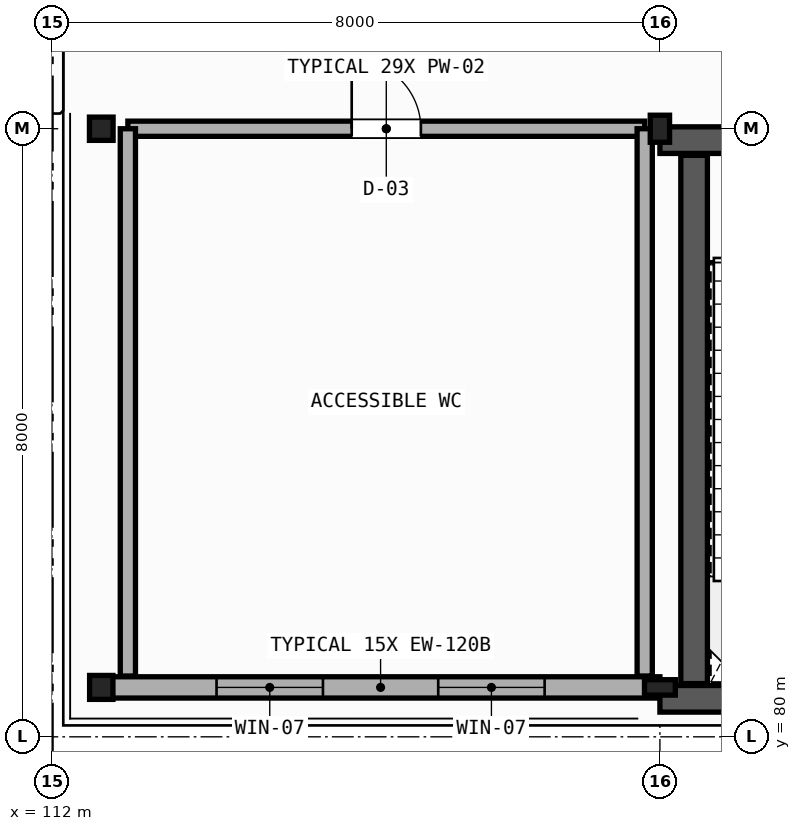
"""IFC4 building model, lengths in metres.
Left out: names, types, materials, properties, quantities, classifications, styles, units other than length and angle.
Written with IfcOpenShell. Run it as: python <this file> out.ifc"""

import sys

from ifc_helpers import new_model, si_unit, direction, frame, frame_2d, origin, origin_2d, place, context, subcontext, project, spatial, rectangle, hollow_rectangle, i_section, extrude, element, fill, save


model = new_model("IFC4")
c1 = context("Model", 3, precision=1e-05, world=origin(), true_north=direction((0.0, 1.0)))
c2 = subcontext(c1, "Body", "Model", "MODEL_VIEW")
j1 = project(units=[si_unit("LENGTHUNIT", "METRE"), si_unit("PLANEANGLEUNIT", "RADIAN")], contexts=[c1])
p1 = place(None, origin())
s1 = spatial("IfcSite", under=j1, at=p1, CompositionType="ELEMENT")
p2 = place(p1, origin())
s2 = spatial("IfcBuilding", under=s1, at=p2, CompositionType="ELEMENT")
p3 = place(p2, frame((0.0, 0.0, 10.2)))
s3 = spatial("IfcBuildingStorey", under=s2, at=p3, CompositionType="ELEMENT", Elevation=10.2)
p4 = place(p3, frame((112.65, 80.65, 0.0), z_axis=(0.0, 0.0, 1.0), x_axis=(1.0, 0.0, 0.0)))
e1 = element("IfcColumn", 1, at=p4, inside=s3, PredefinedType="COLUMN", context=c2, shape_type="SweptSolid", body=[
    extrude(i_section(OverallWidth=0.307, OverallDepth=0.315, WebThickness=0.012, FlangeThickness=0.019, FilletRadius=0.013, at=origin_2d()), origin(), (0.0, 0.0, 1.0), 4.56),
])
p5 = place(p3, frame((112.65, 88.0, 0.0), z_axis=(0.0, 0.0, 1.0), x_axis=(0.0, 1.0, 0.0)))
e2 = element("IfcColumn", 2, at=p5, inside=s3, PredefinedType="COLUMN", context=c2, shape_type="SweptSolid", body=[
    extrude(i_section(OverallWidth=0.306, OverallDepth=0.311, WebThickness=0.011, FlangeThickness=0.017, FilletRadius=0.013, at=origin_2d()), origin(), (0.0, 0.0, 1.0), 4.56),
])
p6 = place(p3, frame((120.0, 80.65, 0.0), z_axis=(0.0, 0.0, 1.0), x_axis=(0.0, 1.0, 0.0)))
e3 = element("IfcColumn", 3, at=p6, inside=s3, PredefinedType="COLUMN", context=c2, shape_type="SweptSolid", body=[
    extrude(hollow_rectangle(XDim=0.203, YDim=0.406, WallThickness=0.012, InnerFilletRadius=0.012, OuterFilletRadius=0.024, at=origin_2d()), origin(), (0.0, 0.0, 1.0), 4.56),
])
p7 = place(p3, frame((120.0, 88.0, 0.0), z_axis=(0.0, 0.0, 1.0), x_axis=(1.0, 0.0, 0.0)))
e4 = element("IfcColumn", 4, at=p7, inside=s3, PredefinedType="COLUMN", context=c2, shape_type="SweptSolid", body=[
    extrude(hollow_rectangle(XDim=0.254, YDim=0.356, WallThickness=0.012, InnerFilletRadius=0.012, OuterFilletRadius=0.024, at=origin_2d()), origin(), (0.0, 0.0, 1.0), 4.56),
])
p8 = place(p3, frame((112.65, 80.65, 0.0), z_axis=(0.0, 0.0, 1.0), x_axis=(1.0, 0.0, 0.0)))
e5 = element("IfcWall", 5, at=p8, inside=s3, PredefinedType="STANDARD", context=c2, shape_type="SweptSolid", body=[
    extrude(rectangle(XDim=7.35, YDim=0.28, at=frame_2d((3.675, 0.0))), origin(), (0.0, 0.0, 1.0), 3.918),
])
p9 = place(p8, frame((1.517, 0.0, 0.95)))
e6 = element("IfcOpeningElement", 6, at=p9, cuts=e5, PredefinedType="OPENING", context=c2, shape_type="SweptSolid", body=[
    extrude(rectangle(XDim=1.4, YDim=2.1, at=frame_2d((0.7, 1.05))), frame((0.0, 0.15, 0.0), z_axis=(0.0, -1.0, 0.0), x_axis=(1.0, 0.0, 0.0)), (0.0, 0.0, 1.0), 0.3),
])
p10 = place(p8, frame((4.433, 0.0, 0.95)))
e7 = element("IfcOpeningElement", 7, at=p10, cuts=e5, PredefinedType="OPENING", context=c2, shape_type="SweptSolid", body=[
    extrude(rectangle(XDim=1.4, YDim=2.1, at=frame_2d((0.7, 1.05))), frame((0.0, 0.15, 0.0), z_axis=(0.0, -1.0, 0.0), x_axis=(1.0, 0.0, 0.0)), (0.0, 0.0, 1.0), 0.3),
])
p11 = place(p3, frame((120.0, 87.85, 0.0), z_axis=(0.0, 0.0, 1.0), x_axis=(1.0, 0.0, 0.0)))
e8 = element("IfcWall", 8, at=p11, inside=s3, PredefinedType="SHEAR", context=c2, shape_type="SweptSolid", body=[
    extrude(rectangle(XDim=5.85, YDim=0.35, at=frame_2d((2.925, 0.0))), origin(), (0.0, 0.0, 1.0), 4.55),
])
p12 = place(p11, frame((1.4, 0.0, 0.0)))
e9 = element("IfcOpeningElement", 9, at=p12, cuts=e8, PredefinedType="OPENING", context=c2, shape_type="SweptSolid", body=[
    extrude(rectangle(XDim=1.05, YDim=2.1, at=frame_2d((0.525, 1.05))), frame((0.0, 0.185, 0.0), z_axis=(0.0, -1.0, 0.0), x_axis=(1.0, 0.0, 0.0)), (0.0, 0.0, 1.0), 0.37),
])
p13 = place(p11, frame((4.25, 0.0, 0.0)))
e10 = element("IfcOpeningElement", 10, at=p13, cuts=e8, PredefinedType="OPENING", context=c2, shape_type="SweptSolid", body=[
    extrude(rectangle(XDim=1.0, YDim=2.15, at=frame_2d((0.5, 1.075))), frame((0.0, 0.185, 0.0), z_axis=(0.0, -1.0, 0.0), x_axis=(1.0, 0.0, 0.0)), (0.0, 0.0, 1.0), 0.37),
])
p14 = place(p3, frame((120.0, 80.5, 0.0), z_axis=(0.0, 0.0, 1.0), x_axis=(1.0, 0.0, 0.0)))
e11 = element("IfcWall", 11, at=p14, inside=s3, PredefinedType="SHEAR", context=c2, shape_type="SweptSolid", body=[
    extrude(rectangle(XDim=5.85, YDim=0.35, at=frame_2d((2.925, 0.0))), origin(), (0.0, 0.0, 1.0), 4.55),
])
p15 = place(p3, frame((120.45, 80.7, 0.0), z_axis=(0.0, 0.0, 1.0), x_axis=(0.0, 1.0, 0.0)))
e12 = element("IfcWall", 12, at=p15, inside=s3, PredefinedType="SHEAR", context=c2, shape_type="SweptSolid", body=[
    extrude(rectangle(XDim=6.95, YDim=0.35, at=frame_2d((3.475, 0.0))), origin(), (0.0, 0.0, 1.0), 4.55),
])
p16 = place(p3, frame((113.0, 88.0, 0.0), z_axis=(0.0, 0.0, 1.0), x_axis=(1.0, 0.0, 0.0)))
e13 = element("IfcWall", 13, at=p16, inside=s3, PredefinedType="PLUMBINGWALL", context=c2, shape_type="SweptSolid", body=[
    extrude(rectangle(XDim=6.8, YDim=0.2, at=frame_2d((3.4, 0.0))), origin(), (0.0, 0.0, 1.0), 3.908),
])
p17 = place(p16, frame((2.945, 0.0, 0.0)))
e14 = element("IfcOpeningElement", 14, at=p17, cuts=e13, PredefinedType="OPENING", context=c2, shape_type="SweptSolid", body=[
    extrude(rectangle(XDim=0.91, YDim=2.1, at=frame_2d((0.455, 1.05))), frame((0.0, 0.11, 0.0), z_axis=(0.0, -1.0, 0.0), x_axis=(1.0, 0.0, 0.0)), (0.0, 0.0, 1.0), 0.22),
])
p18 = place(p3, frame((113.0, 80.8, 0.0), z_axis=(0.0, 0.0, 1.0), x_axis=(0.0, 1.0, 0.0)))
e15 = element("IfcWall", 15, at=p18, inside=s3, PredefinedType="PLUMBINGWALL", context=c2, shape_type="SweptSolid", body=[
    extrude(rectangle(XDim=7.2, YDim=0.2, at=frame_2d((3.6, 0.0))), origin(), (0.0, 0.0, 1.0), 4.29),
])
p19 = place(p3, frame((119.8, 80.8, 0.0), z_axis=(0.0, 0.0, 1.0), x_axis=(0.0, 1.0, 0.0)))
e16 = element("IfcWall", 16, at=p19, inside=s3, PredefinedType="PLUMBINGWALL", context=c2, shape_type="SweptSolid", body=[
    extrude(rectangle(XDim=7.2, YDim=0.2, at=frame_2d((3.6, 0.0))), origin(), (0.0, 0.0, 1.0), 3.918),
])
p20 = place(p9, origin())
e17 = element("IfcWindow", 17, at=p20, inside=s3, PartitioningType="SINGLE_PANEL", PredefinedType="WINDOW", context=c2, shape_type="SweptSolid", body=[
    extrude(rectangle(XDim=1.4, YDim=2.1, at=frame_2d((0.7, 1.05))), frame((0.0, 0.03, 0.0), z_axis=(0.0, -1.0, 0.0), x_axis=(1.0, 0.0, 0.0)), (0.0, 0.0, 1.0), 0.06),
])
fill(e6, e17)
p21 = place(p10, origin())
e18 = element("IfcWindow", 18, at=p21, inside=s3, PartitioningType="SINGLE_PANEL", PredefinedType="WINDOW", context=c2, shape_type="SweptSolid", body=[
    extrude(rectangle(XDim=1.4, YDim=2.1, at=frame_2d((0.7, 1.05))), frame((0.0, 0.03, 0.0), z_axis=(0.0, -1.0, 0.0), x_axis=(1.0, 0.0, 0.0)), (0.0, 0.0, 1.0), 0.06),
])
fill(e7, e18)
p22 = place(p17, origin())
e19 = element("IfcDoor", 19, at=p22, inside=s3, OperationType="SINGLE_SWING_LEFT", PredefinedType="DOOR", context=c2, shape_type="SweptSolid", body=[
    extrude(rectangle(XDim=0.91, YDim=2.1, at=frame_2d((0.455, 1.05))), frame((0.0, 0.025, 0.0), z_axis=(0.0, -1.0, 0.0), x_axis=(1.0, 0.0, 0.0)), (0.0, 0.0, 1.0), 0.05),
])
fill(e14, e19)
save(model, sys.argv[1])
